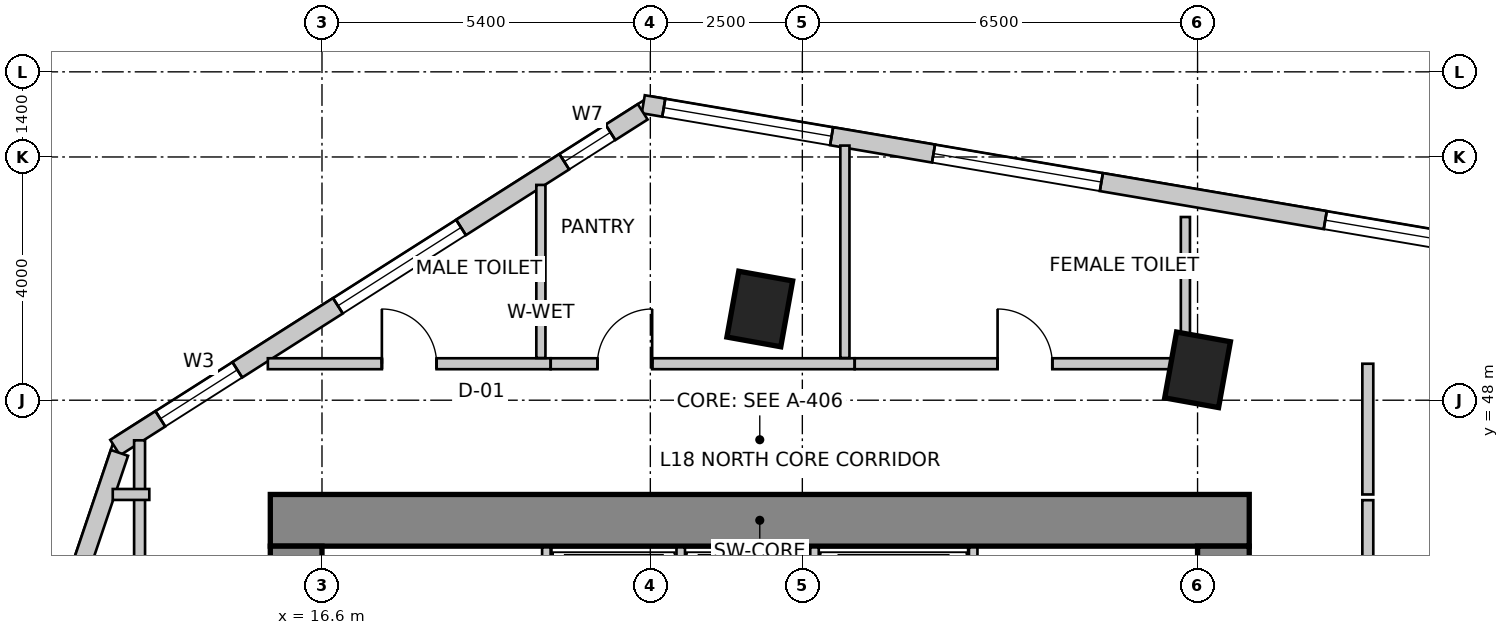
"""IFC4 building model, lengths in metres.
Left out: names, types, materials, properties, quantities, classifications, styles, units other than length and angle.
Written with IfcOpenShell. Run it as: python <this file> out.ifc"""

import sys

from ifc_helpers import new_model, si_unit, direction, frame, frame_2d, origin, origin_2d, place, context, subcontext, project, spatial, rectangle, extrude, source, transform, mapped, element, fill, save


model = new_model("IFC4")
c1 = context("Model", 3, precision=1e-05, world=origin(), true_north=direction((0.0, 1.0)))
c2 = subcontext(c1, "Body", "Model", "MODEL_VIEW")
j1 = project(units=[si_unit("LENGTHUNIT", "METRE"), si_unit("PLANEANGLEUNIT", "RADIAN")], contexts=[c1])
p1 = place(None, origin())
s1 = spatial("IfcSite", under=j1, at=p1, CompositionType="ELEMENT")
p2 = place(p1, origin())
s2 = spatial("IfcBuilding", under=s1, at=p2, CompositionType="ELEMENT")
p3 = place(p2, frame((0.0, 0.0, 75.0)))
s3 = spatial("IfcBuildingStorey", under=s2, at=p3, CompositionType="ELEMENT", Elevation=75.0)
p4 = place(p3, frame((15.75, 46.025, 0.0), z_axis=(0.0, 0.0, 1.0), x_axis=(1.0, 0.0, 0.0)))
e1 = element("IfcWall", 1, at=p4, inside=s3, PredefinedType="SHEAR", context=c2, shape_type="SweptSolid", body=[
    extrude(rectangle(XDim=16.1, YDim=0.85, at=frame_2d((8.05, 0.0))), origin(), (0.0, 0.0, 1.0), 4.0),
])
p5 = place(p3, frame((16.175, 34.2, 0.0), z_axis=(0.0, 0.0, 1.0), x_axis=(0.0, 1.0, 0.0)))
e2 = element("IfcWall", 2, at=p5, inside=s3, PredefinedType="SHEAR", context=c2, shape_type="SweptSolid", body=[
    extrude(rectangle(XDim=11.4, YDim=0.85, at=frame_2d((5.7, 0.0))), origin(), (0.0, 0.0, 1.0), 4.0),
])
m1 = source(origin(), c2, "Body", "SweptSolid", [
    extrude(rectangle(XDim=1.1, YDim=2.15, at=frame_2d((0.55, 1.075))), frame((0.0, 0.435, 0.0), z_axis=(0.0, -1.0, 0.0), x_axis=(1.0, 0.0, 0.0)), (0.0, 0.0, 1.0), 0.87),
])
p6 = place(p5, frame((7.15, 0.0, 0.0)))
e3 = element("IfcOpeningElement", 3, at=p6, cuts=e2, PredefinedType="OPENING", context=c2, shape_type="MappedRepresentation", body=[
    mapped(m1, transform((0.0, 0.0, 0.0), scale=1.0)),
])
p7 = place(p3, frame((31.425, 34.2, 0.0), z_axis=(0.0, 0.0, 1.0), x_axis=(0.0, 1.0, 0.0)))
e4 = element("IfcWall", 4, at=p7, inside=s3, PredefinedType="SHEAR", context=c2, shape_type="SweptSolid", body=[
    extrude(rectangle(XDim=11.4, YDim=0.85, at=frame_2d((5.7, 0.0))), origin(), (0.0, 0.0, 1.0), 4.0),
])
p8 = place(p7, frame((7.35, 0.0, 0.0)))
e5 = element("IfcOpeningElement", 5, at=p8, cuts=e4, PredefinedType="OPENING", context=c2, shape_type="MappedRepresentation", body=[
    mapped(m1, transform((0.0, 0.0, 0.0), scale=1.0)),
])
m2 = source(origin(), c2, "Body", "SweptSolid", [
    extrude(rectangle(XDim=0.9, YDim=1.1, at=origin_2d()), origin(), (0.0, 0.0, 1.0), 4.0),
])
for number, where, z_axis, x_axis in (
    (6, (23.8, 49.5, 0.0), (0.0, 0.0, 1.0), (0.984, -0.177, 0.0)),
    (7, (31.0, 48.5, 0.0), (0.0, 0.0, 1.0), (0.984, -0.177, 0.0)),
):
    element("IfcColumn", number, at=place(p3, frame(where, z_axis=z_axis, x_axis=x_axis)), inside=s3, PredefinedType="COLUMN", context=c2, shape_type="MappedRepresentation", body=[
        mapped(m2, transform((0.0, 0.0, 0.0), scale=1.0)),
    ])
p9 = place(p3, frame((53.961, 47.417, 0.0), z_axis=(0.0, 0.0, 1.0), x_axis=(-0.985865713455, 0.167537443678, 0.0)))
e8 = element("IfcWall", 8, at=p9, inside=s3, PredefinedType="SOLIDWALL", context=c2, shape_type="SweptSolid", body=[
    extrude(rectangle(XDim=32.537, YDim=0.3, at=frame_2d((16.269, 0.0))), origin(), (0.0, 0.0, 1.0), 3.75),
])
m3 = source(origin(), c2, "Body", "SweptSolid", [
    extrude(rectangle(XDim=2.4, YDim=2.2, at=frame_2d((1.2, 1.1))), frame((0.0, 0.16, 0.0), z_axis=(0.0, -1.0, 0.0), x_axis=(1.0, 0.0, 0.0)), (0.0, 0.0, 1.0), 0.32),
])
p10 = place(p9, frame((0.375, 0.0, 0.85)))
e9 = element("IfcOpeningElement", 9, at=p10, cuts=e8, PredefinedType="OPENING", context=c2, shape_type="MappedRepresentation", body=[
    mapped(m3, transform((0.0, 0.0, 0.0), scale=1.0)),
])
m4 = source(origin(), c2, "Body", "SweptSolid", [
    extrude(rectangle(XDim=2.8, YDim=2.4, at=frame_2d((1.4, 1.2))), frame((0.0, 0.16, 0.0), z_axis=(0.0, -1.0, 0.0), x_axis=(1.0, 0.0, 0.0)), (0.0, 0.0, 1.0), 0.32),
])
p11 = place(p9, frame((3.822, 0.0, 0.85)))
e10 = element("IfcOpeningElement", 10, at=p11, cuts=e8, PredefinedType="OPENING", context=c2, shape_type="MappedRepresentation", body=[
    mapped(m4, transform((0.0, 0.0, 0.0), scale=1.0)),
])
p12 = place(p9, frame((8.168, 0.0, 0.85)))
e11 = element("IfcOpeningElement", 11, at=p12, cuts=e8, PredefinedType="OPENING", context=c2, shape_type="MappedRepresentation", body=[
    mapped(m4, transform((0.0, 0.0, 0.0), scale=1.0)),
])
p13 = place(p9, frame((12.513, 0.0, 0.85)))
e12 = element("IfcOpeningElement", 12, at=p13, cuts=e8, PredefinedType="OPENING", context=c2, shape_type="MappedRepresentation", body=[
    mapped(m4, transform((0.0, 0.0, 0.0), scale=1.0)),
])
p14 = place(p9, frame((18.36, 0.0, 0.85)))
e13 = element("IfcOpeningElement", 13, at=p14, cuts=e8, PredefinedType="OPENING", context=c2, shape_type="MappedRepresentation", body=[
    mapped(m4, transform((0.0, 0.0, 0.0), scale=1.0)),
])
p15 = place(p9, frame((24.895, 0.0, 0.85)))
e14 = element("IfcOpeningElement", 14, at=p15, cuts=e8, PredefinedType="OPENING", context=c2, shape_type="MappedRepresentation", body=[
    mapped(m4, transform((0.0, 0.0, 0.0), scale=1.0)),
])
p16 = place(p9, frame((29.395, 0.0, 0.85)))
e15 = element("IfcOpeningElement", 15, at=p16, cuts=e8, PredefinedType="OPENING", context=c2, shape_type="MappedRepresentation", body=[
    mapped(m4, transform((0.0, 0.0, 0.0), scale=1.0)),
])
p17 = place(p3, frame((21.875, 52.742, 0.0), z_axis=(0.0, 0.0, 1.0), x_axis=(-0.843662465249, -0.536873956092, 0.0)))
e16 = element("IfcWall", 16, at=p17, inside=s3, PredefinedType="SOLIDWALL", context=c2, shape_type="SweptSolid", body=[
    extrude(rectangle(XDim=10.284, YDim=0.3, at=frame_2d((5.142, 0.0))), origin(), (0.0, 0.0, 1.0), 3.75),
])
m5 = source(origin(), c2, "Body", "SweptSolid", [
    extrude(rectangle(XDim=0.9, YDim=1.6, at=frame_2d((0.45, 0.8))), frame((0.0, 0.16, 0.0), z_axis=(0.0, -1.0, 0.0), x_axis=(1.0, 0.0, 0.0)), (0.0, 0.0, 1.0), 0.32),
])
p18 = place(p17, frame((0.629, 0.0, 0.85)))
e17 = element("IfcOpeningElement", 17, at=p18, cuts=e16, PredefinedType="OPENING", context=c2, shape_type="MappedRepresentation", body=[
    mapped(m5, transform((0.0, 0.0, 0.0), scale=1.0)),
])
p19 = place(p17, frame((3.542, 0.0, 0.85)))
e18 = element("IfcOpeningElement", 18, at=p19, cuts=e16, PredefinedType="OPENING", context=c2, shape_type="MappedRepresentation", body=[
    mapped(m3, transform((0.0, 0.0, 0.0), scale=1.0)),
])
m6 = source(origin(), c2, "Body", "SweptSolid", [
    extrude(rectangle(XDim=1.5, YDim=1.8, at=frame_2d((0.75, 0.9))), frame((0.0, 0.16, 0.0), z_axis=(0.0, -1.0, 0.0), x_axis=(1.0, 0.0, 0.0)), (0.0, 0.0, 1.0), 0.32),
])
p20 = place(p17, frame((7.903, 0.0, 0.85)))
e19 = element("IfcOpeningElement", 19, at=p20, cuts=e16, PredefinedType="OPENING", context=c2, shape_type="MappedRepresentation", body=[
    mapped(m6, transform((0.0, 0.0, 0.0), scale=1.0)),
])
p21 = place(p3, frame((13.269, 47.134, 0.0), z_axis=(0.0, 0.0, 1.0), x_axis=(-0.319920423265, -0.947444416722, 0.0)))
e20 = element("IfcWall", 20, at=p21, inside=s3, PredefinedType="SOLIDWALL", context=c2, shape_type="SweptSolid", body=[
    extrude(rectangle(XDim=16.135, YDim=0.3, at=frame_2d((8.067, 0.0))), origin(), (0.0, 0.0, 1.0), 3.75),
])
p22 = place(p21, frame((1.988, 0.0, 0.85)))
e21 = element("IfcOpeningElement", 21, at=p22, cuts=e20, PredefinedType="OPENING", context=c2, shape_type="MappedRepresentation", body=[
    mapped(m4, transform((0.0, 0.0, 0.0), scale=1.0)),
])
p23 = place(p21, frame((7.159, 0.0, 0.85)))
e22 = element("IfcOpeningElement", 22, at=p23, cuts=e20, PredefinedType="OPENING", context=c2, shape_type="MappedRepresentation", body=[
    mapped(m3, transform((0.0, 0.0, 0.0), scale=1.0)),
])
p24 = place(p21, frame((11.93, 0.0, 0.85)))
e23 = element("IfcOpeningElement", 23, at=p24, cuts=e20, PredefinedType="OPENING", context=c2, shape_type="MappedRepresentation", body=[
    mapped(m4, transform((0.0, 0.0, 0.0), scale=1.0)),
])
for number, where, z_axis, x_axis in (
    (24, (20.29, 43.28, 0.0), (0.0, 0.0, 1.0), (0.0, 1.0, 0.0)),
    (25, (27.31, 43.28, 0.0), (0.0, 0.0, 1.0), (0.0, 1.0, 0.0)),
):
    element("IfcWall", number, at=place(p3, frame(where, z_axis=z_axis, x_axis=x_axis)), inside=s3, PredefinedType="SOLIDWALL", context=c2, shape_type="SweptSolid", body=[
        extrude(rectangle(XDim=2.3, YDim=0.14, at=frame_2d((1.15, 0.0))), origin(), (0.0, 0.0, 1.0), 3.75),
    ])
for number, where, z_axis, x_axis in (
    (26, (22.5, 43.02, 0.0), (0.0, 0.0, 1.0), (0.0, 1.0, 0.0)),
    (27, (24.7, 43.02, 0.0), (0.0, 0.0, 1.0), (0.0, 1.0, 0.0)),
):
    element("IfcWall", number, at=place(p3, frame(where, z_axis=z_axis, x_axis=x_axis)), inside=s3, PredefinedType="SOLIDWALL", context=c2, shape_type="SweptSolid", body=[
        extrude(rectangle(XDim=2.56, YDim=0.14, at=frame_2d((1.28, 0.0))), origin(), (0.0, 0.0, 1.0), 3.75),
    ])
p25 = place(p3, frame((13.6, 33.444, 0.0), z_axis=(0.0, 0.0, 1.0), x_axis=(0.0, 1.0, 0.0)))
e28 = element("IfcWall", 28, at=p25, inside=s3, PredefinedType="PARTITIONING", context=c2, shape_type="SweptSolid", body=[
    extrude(rectangle(XDim=13.896, YDim=0.18, at=frame_2d((6.948, 0.0))), origin(), (0.0, 0.0, 1.0), 2.892),
])
m7 = source(origin(), c2, "Body", "SweptSolid", [
    extrude(rectangle(XDim=0.9, YDim=2.15, at=frame_2d((0.45, 1.075))), frame((0.0, 0.1, 0.0), z_axis=(0.0, -1.0, 0.0), x_axis=(1.0, 0.0, 0.0)), (0.0, 0.0, 1.0), 0.2),
])
p26 = place(p25, frame((4.144, 0.0, 0.0)))
e29 = element("IfcOpeningElement", 29, at=p26, cuts=e28, PredefinedType="OPENING", context=c2, shape_type="MappedRepresentation", body=[
    mapped(m7, transform((0.0, 0.0, 0.0), scale=1.0)),
])
p27 = place(p3, frame((13.76, 46.45, 0.0), z_axis=(0.0, 0.0, 1.0), x_axis=(-1.0, 0.0, 0.0)))
e30 = element("IfcWall", 30, at=p27, inside=s3, PredefinedType="PARTITIONING", context=c2, shape_type="SweptSolid", body=[
    extrude(rectangle(XDim=0.601, YDim=0.18, at=frame_2d((0.301, 0.0))), origin(), (0.0, 0.0, 1.0), 3.75),
])
p28 = place(p3, frame((15.71, 48.6, 0.0), z_axis=(0.0, 0.0, 1.0), x_axis=(1.0, 0.0, 0.0)))
e31 = element("IfcWall", 31, at=p28, inside=s3, PredefinedType="PARTITIONING", context=c2, shape_type="SweptSolid", body=[
    extrude(rectangle(XDim=4.65, YDim=0.18, at=frame_2d((2.325, 0.0))), origin(), (0.0, 0.0, 1.0), 3.75),
])
p29 = place(p28, frame((1.875, 0.0, 0.0)))
e32 = element("IfcOpeningElement", 32, at=p29, cuts=e31, PredefinedType="OPENING", context=c2, shape_type="MappedRepresentation", body=[
    mapped(m7, transform((0.0, 0.0, 0.0), scale=1.0)),
])
p30 = place(p3, frame((20.362, 48.6, 0.0), z_axis=(0.0, 0.0, 1.0), x_axis=(1.0, 0.0, 0.0)))
e33 = element("IfcWall", 33, at=p30, inside=s3, PredefinedType="PARTITIONING", context=c2, shape_type="SweptSolid", body=[
    extrude(rectangle(XDim=4.998, YDim=0.18, at=frame_2d((2.499, 0.0))), origin(), (0.0, 0.0, 1.0), 3.335),
])
p31 = place(p30, frame((0.768, 0.0, 0.0)))
e34 = element("IfcOpeningElement", 34, at=p31, cuts=e33, PredefinedType="OPENING", context=c2, shape_type="MappedRepresentation", body=[
    mapped(m7, transform((0.0, 0.0, 0.0), scale=1.0)),
])
p32 = place(p3, frame((25.362, 48.6, 0.0), z_axis=(0.0, 0.0, 1.0), x_axis=(1.0, 0.0, 0.0)))
e35 = element("IfcWall", 35, at=p32, inside=s3, PredefinedType="PARTITIONING", context=c2, shape_type="SweptSolid", body=[
    extrude(rectangle(XDim=5.598, YDim=0.18, at=frame_2d((2.799, 0.0))), origin(), (0.0, 0.0, 1.0), 2.892),
])
p33 = place(p32, frame((2.349, 0.0, 0.0)))
e36 = element("IfcOpeningElement", 36, at=p33, cuts=e35, PredefinedType="OPENING", context=c2, shape_type="MappedRepresentation", body=[
    mapped(m7, transform((0.0, 0.0, 0.0), scale=1.0)),
])
p34 = place(p3, frame((33.8, 48.6, 0.0), z_axis=(0.0, 0.0, 1.0), x_axis=(0.0, -1.0, 0.0)))
e37 = element("IfcWall", 37, at=p34, inside=s3, PredefinedType="PARTITIONING", context=c2, shape_type="SweptSolid", body=[
    extrude(rectangle(XDim=2.15, YDim=0.18, at=frame_2d((1.075, 0.0))), origin(), (0.0, 0.0, 1.0), 2.892),
])
p35 = place(p3, frame((33.8, 46.356, 0.0), z_axis=(0.0, 0.0, 1.0), x_axis=(0.0, -1.0, 0.0)))
e38 = element("IfcWall", 38, at=p35, inside=s3, PredefinedType="PARTITIONING", context=c2, shape_type="SweptSolid", body=[
    extrude(rectangle(XDim=8.516, YDim=0.18, at=frame_2d((4.258, 0.0))), origin(), (0.0, 0.0, 1.0), 3.188),
])
p36 = place(p3, frame((20.2, 51.54, 0.0), z_axis=(0.0, 0.0, 1.0), x_axis=(0.0, -1.0, 0.0)))
e39 = element("IfcWall", 39, at=p36, inside=s3, PredefinedType="PARTITIONING", context=c2, shape_type="SweptSolid", body=[
    extrude(rectangle(XDim=2.846, YDim=0.15, at=frame_2d((1.423, 0.0))), origin(), (0.0, 0.0, 1.0), 3.75),
])
p37 = place(p3, frame((25.2, 52.188, 0.0), z_axis=(0.0, 0.0, 1.0), x_axis=(0.0, -1.0, 0.0)))
e40 = element("IfcWall", 40, at=p37, inside=s3, PredefinedType="PARTITIONING", context=c2, shape_type="SweptSolid", body=[
    extrude(rectangle(XDim=3.493, YDim=0.15, at=frame_2d((1.747, 0.0))), origin(), (0.0, 0.0, 1.0), 2.892),
])
p38 = place(p3, frame((30.8, 51.013, 0.0), z_axis=(0.0, 0.0, 1.0), x_axis=(0.0, -1.0, 0.0)))
e41 = element("IfcWall", 41, at=p38, inside=s3, PredefinedType="PARTITIONING", context=c2, shape_type="SweptSolid", body=[
    extrude(rectangle(XDim=2.193, YDim=0.15, at=frame_2d((1.096, 0.0))), origin(), (0.0, 0.0, 1.0), 3.75),
])
m8 = source(origin(), c2, "Body", "SweptSolid", [
    extrude(rectangle(XDim=2.8, YDim=2.4, at=frame_2d((1.4, 1.2))), frame((0.0, -0.015, 0.0), z_axis=(0.0, -1.0, 0.0), x_axis=(1.0, 0.0, 0.0)), (0.0, 0.0, 1.0), 0.06),
])
p39 = place(p14, origin())
e42 = element("IfcWindow", 42, at=p39, inside=s3, PartitioningType="SINGLE_PANEL", PredefinedType="WINDOW", context=c2, shape_type="MappedRepresentation", body=[
    mapped(m8, transform((0.0, 0.0, 0.0), scale=1.0)),
])
fill(e13, e42)
p40 = place(p15, origin())
e43 = element("IfcWindow", 43, at=p40, inside=s3, PartitioningType="SINGLE_PANEL", PredefinedType="WINDOW", context=c2, shape_type="MappedRepresentation", body=[
    mapped(m8, transform((0.0, 0.0, 0.0), scale=1.0)),
])
fill(e14, e43)
p41 = place(p16, origin())
e44 = element("IfcWindow", 44, at=p41, inside=s3, PartitioningType="SINGLE_PANEL", PredefinedType="WINDOW", context=c2, shape_type="MappedRepresentation", body=[
    mapped(m8, transform((0.0, 0.0, 0.0), scale=1.0)),
])
fill(e15, e44)
m9 = source(origin(), c2, "Body", "SweptSolid", [
    extrude(rectangle(XDim=0.9, YDim=1.6, at=frame_2d((0.45, 0.8))), frame((0.0, -0.015, 0.0), z_axis=(0.0, -1.0, 0.0), x_axis=(1.0, 0.0, 0.0)), (0.0, 0.0, 1.0), 0.06),
])
p42 = place(p18, origin())
e45 = element("IfcWindow", 45, at=p42, inside=s3, PartitioningType="SINGLE_PANEL", PredefinedType="WINDOW", context=c2, shape_type="MappedRepresentation", body=[
    mapped(m9, transform((0.0, 0.0, 0.0), scale=1.0)),
])
fill(e17, e45)
m10 = source(origin(), c2, "Body", "SweptSolid", [
    extrude(rectangle(XDim=2.4, YDim=2.2, at=frame_2d((1.2, 1.1))), frame((0.0, -0.015, 0.0), z_axis=(0.0, -1.0, 0.0), x_axis=(1.0, 0.0, 0.0)), (0.0, 0.0, 1.0), 0.06),
])
p43 = place(p19, origin())
e46 = element("IfcWindow", 46, at=p43, inside=s3, PartitioningType="SINGLE_PANEL", PredefinedType="WINDOW", context=c2, shape_type="MappedRepresentation", body=[
    mapped(m10, transform((0.0, 0.0, 0.0), scale=1.0)),
])
fill(e18, e46)
m11 = source(origin(), c2, "Body", "SweptSolid", [
    extrude(rectangle(XDim=1.5, YDim=1.8, at=frame_2d((0.75, 0.9))), frame((0.0, -0.015, 0.0), z_axis=(0.0, -1.0, 0.0), x_axis=(1.0, 0.0, 0.0)), (0.0, 0.0, 1.0), 0.06),
])
p44 = place(p20, origin())
e47 = element("IfcWindow", 47, at=p44, inside=s3, PartitioningType="SINGLE_PANEL", PredefinedType="WINDOW", context=c2, shape_type="MappedRepresentation", body=[
    mapped(m11, transform((0.0, 0.0, 0.0), scale=1.0)),
])
fill(e19, e47)
m12 = source(origin(), c2, "Body", "SweptSolid", [
    extrude(rectangle(XDim=0.9, YDim=2.15, at=frame_2d((0.45, 1.075))), frame((0.0, 0.025, 0.0), z_axis=(0.0, -1.0, 0.0), x_axis=(1.0, 0.0, 0.0)), (0.0, 0.0, 1.0), 0.05),
])
p45 = place(p29, origin())
e48 = element("IfcDoor", 48, at=p45, inside=s3, OperationType="SINGLE_SWING_LEFT", PredefinedType="DOOR", context=c2, shape_type="MappedRepresentation", body=[
    mapped(m12, transform((0.0, 0.0, 0.0), scale=1.0)),
])
fill(e32, e48)
p46 = place(p31, origin())
e49 = element("IfcDoor", 49, at=p46, inside=s3, OperationType="SINGLE_SWING_RIGHT", PredefinedType="DOOR", context=c2, shape_type="MappedRepresentation", body=[
    mapped(m12, transform((0.0, 0.0, 0.0), scale=1.0)),
])
fill(e34, e49)
p47 = place(p33, origin())
e50 = element("IfcDoor", 50, at=p47, inside=s3, OperationType="SINGLE_SWING_LEFT", PredefinedType="DOOR", context=c2, shape_type="MappedRepresentation", body=[
    mapped(m12, transform((0.0, 0.0, 0.0), scale=1.0)),
])
fill(e36, e50)
save(model, sys.argv[1])
